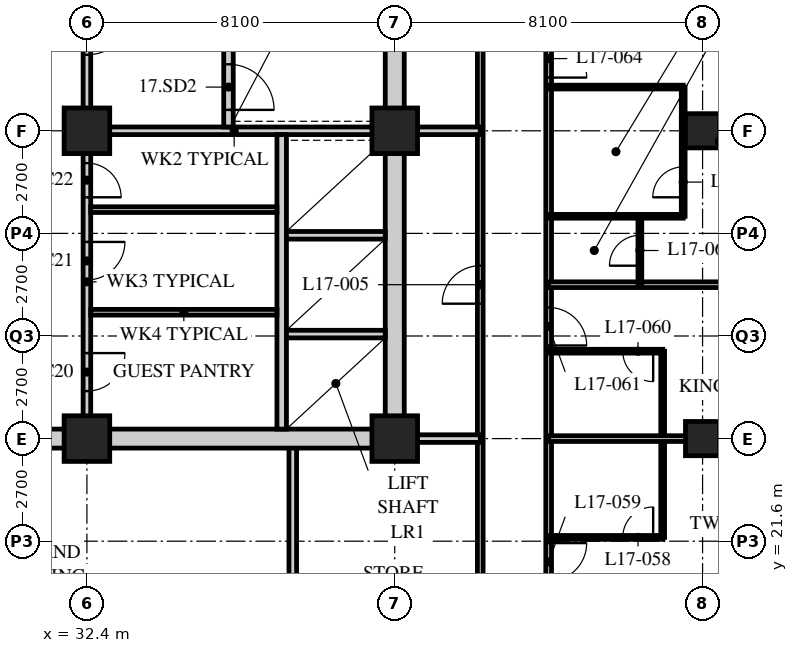
"""IFC4 building model, lengths in metres.
Left out: names, types, materials, properties, quantities, classifications, styles, units other than length and angle.
Written with IfcOpenShell. Run it as: python <this file> out.ifc"""

import sys

from ifc_helpers import new_model, si_unit, direction, frame, frame_2d, origin, origin_2d, place, context, subcontext, project, spatial, rectangle, hollow_rectangle, extrude, element, fill, save


model = new_model("IFC4")
c1 = context("Model", 3, precision=1e-05, world=origin(), true_north=direction((0.0, 1.0)))
c2 = subcontext(c1, "Body", "Model", "MODEL_VIEW")
j1 = project(units=[si_unit("LENGTHUNIT", "METRE"), si_unit("PLANEANGLEUNIT", "RADIAN")], contexts=[c1])
p1 = place(None, origin())
s1 = spatial("IfcSite", under=j1, at=p1, CompositionType="ELEMENT")
p2 = place(p1, origin())
s2 = spatial("IfcBuilding", under=s1, at=p2, CompositionType="ELEMENT")
p3 = place(p2, frame((0.0, 0.0, 70.4)))
s3 = spatial("IfcBuildingStorey", under=s2, at=p3, CompositionType="ELEMENT", Elevation=70.4)
for number, where, z_axis, x_axis in (
    (1, (32.4, 24.3, 0.0), (0.0, 0.0, 1.0), (1.0, 0.0, 0.0)),
    (2, (32.4, 32.4, 0.0), (0.0, 0.0, 1.0), (1.0, 0.0, 0.0)),
    (3, (40.5, 24.3, 0.0), (0.0, 0.0, 1.0), (1.0, 0.0, 0.0)),
    (4, (40.5, 32.4, 0.0), (0.0, 0.0, 1.0), (1.0, 0.0, 0.0)),
):
    element("IfcColumn", number, at=place(p3, frame(where, z_axis=z_axis, x_axis=x_axis)), inside=s3, PredefinedType="COLUMN", context=c2, shape_type="SweptSolid", body=[
        extrude(hollow_rectangle(XDim=1.2, YDim=1.2, WallThickness=0.12, at=origin_2d()), origin(), (0.0, 0.0, 1.0), 3.4),
    ])
for number, where, z_axis, x_axis in (
    (5, (48.6, 24.3, 0.0), (0.0, 0.0, 1.0), (1.0, 0.0, 0.0)),
    (6, (48.6, 32.4, 0.0), (0.0, 0.0, 1.0), (1.0, 0.0, 0.0)),
):
    element("IfcColumn", number, at=place(p3, frame(where, z_axis=z_axis, x_axis=x_axis)), inside=s3, PredefinedType="COLUMN", context=c2, shape_type="SweptSolid", body=[
        extrude(hollow_rectangle(XDim=0.9, YDim=0.9, WallThickness=0.09, at=origin_2d()), origin(), (0.0, 0.0, 1.0), 3.4),
    ])
p4 = place(p3, frame((44.55, 12.15, 0.0), z_axis=(0.0, 0.0, 1.0), x_axis=(0.0, 1.0, 0.0)))
e7 = element("IfcWall", 7, at=p4, inside=s3, PredefinedType="PARTITIONING", context=c2, shape_type="SweptSolid", body=[
    extrude(rectangle(XDim=30.15, YDim=0.15, at=frame_2d((15.075, 0.0))), origin(), (0.0, 0.0, 1.0), 3.19),
])
p5 = place(p4, frame((2.45, 0.0, 0.0)))
e8 = element("IfcOpeningElement", 8, at=p5, cuts=e7, PredefinedType="OPENING", context=c2, shape_type="SweptSolid", body=[
    extrude(rectangle(XDim=1.0, YDim=2.1, at=frame_2d((0.5, 1.05))), frame((0.0, 0.085, 0.0), z_axis=(0.0, -1.0, 0.0), x_axis=(1.0, 0.0, 0.0)), (0.0, 0.0, 1.0), 0.17),
])
p6 = place(p4, frame((4.35, 0.0, 0.0)))
e9 = element("IfcOpeningElement", 9, at=p6, cuts=e7, PredefinedType="OPENING", context=c2, shape_type="SweptSolid", body=[
    extrude(rectangle(XDim=1.0, YDim=2.1, at=frame_2d((0.5, 1.05))), frame((0.0, 0.085, 0.0), z_axis=(0.0, -1.0, 0.0), x_axis=(1.0, 0.0, 0.0)), (0.0, 0.0, 1.0), 0.17),
])
p7 = place(p4, frame((8.4, 0.0, 0.0)))
e10 = element("IfcOpeningElement", 10, at=p7, cuts=e7, PredefinedType="OPENING", context=c2, shape_type="SweptSolid", body=[
    extrude(rectangle(XDim=1.0, YDim=2.1, at=frame_2d((0.5, 1.05))), frame((0.0, 0.085, 0.0), z_axis=(0.0, -1.0, 0.0), x_axis=(1.0, 0.0, 0.0)), (0.0, 0.0, 1.0), 0.17),
])
p8 = place(p4, frame((14.6, 0.0, 0.0)))
e11 = element("IfcOpeningElement", 11, at=p8, cuts=e7, PredefinedType="OPENING", context=c2, shape_type="SweptSolid", body=[
    extrude(rectangle(XDim=1.0, YDim=2.1, at=frame_2d((0.5, 1.05))), frame((0.0, 0.085, 0.0), z_axis=(0.0, -1.0, 0.0), x_axis=(1.0, 0.0, 0.0)), (0.0, 0.0, 1.0), 0.17),
])
p9 = place(p4, frame((21.65, 0.0, 0.0)))
e12 = element("IfcOpeningElement", 12, at=p9, cuts=e7, PredefinedType="OPENING", context=c2, shape_type="SweptSolid", body=[
    extrude(rectangle(XDim=1.0, YDim=2.1, at=frame_2d((0.5, 1.05))), frame((0.0, 0.085, 0.0), z_axis=(0.0, -1.0, 0.0), x_axis=(1.0, 0.0, 0.0)), (0.0, 0.0, 1.0), 0.17),
])
p10 = place(p4, frame((26.7, 0.0, 0.0)))
e13 = element("IfcOpeningElement", 13, at=p10, cuts=e7, PredefinedType="OPENING", context=c2, shape_type="SweptSolid", body=[
    extrude(rectangle(XDim=1.0, YDim=2.1, at=frame_2d((0.5, 1.05))), frame((0.0, 0.085, 0.0), z_axis=(0.0, -1.0, 0.0), x_axis=(1.0, 0.0, 0.0)), (0.0, 0.0, 1.0), 0.17),
])
p11 = place(p3, frame((42.75, 13.95, 0.0), z_axis=(0.0, 0.0, 1.0), x_axis=(0.0, 1.0, 0.0)))
e14 = element("IfcWall", 14, at=p11, inside=s3, PredefinedType="PARTITIONING", context=c2, shape_type="SweptSolid", body=[
    extrude(rectangle(XDim=26.55, YDim=0.15, at=frame_2d((13.275, 0.0))), origin(), (0.0, 0.0, 1.0), 3.19),
])
p12 = place(p11, frame((13.9, 0.0, 0.0)))
e15 = element("IfcOpeningElement", 15, at=p12, cuts=e14, PredefinedType="OPENING", context=c2, shape_type="SweptSolid", body=[
    extrude(rectangle(XDim=1.0, YDim=2.1, at=frame_2d((0.5, 1.05))), frame((0.0, 0.085, 0.0), z_axis=(0.0, -1.0, 0.0), x_axis=(1.0, 0.0, 0.0)), (0.0, 0.0, 1.0), 0.17),
])
p13 = place(p11, frame((22.0, 0.0, 0.0)))
e16 = element("IfcOpeningElement", 16, at=p13, cuts=e14, PredefinedType="OPENING", context=c2, shape_type="SweptSolid", body=[
    extrude(rectangle(XDim=1.0, YDim=2.1, at=frame_2d((0.5, 1.05))), frame((0.0, 0.085, 0.0), z_axis=(0.0, -1.0, 0.0), x_axis=(1.0, 0.0, 0.0)), (0.0, 0.0, 1.0), 0.17),
])
p14 = place(p3, frame((40.5, 32.4, 0.0), z_axis=(0.0, 0.0, 1.0), x_axis=(1.0, 0.0, 0.0)))
e17 = element("IfcWall", 17, at=p14, inside=s3, PredefinedType="SOLIDWALL", context=c2, shape_type="SweptSolid", body=[
    extrude(rectangle(XDim=2.25, YDim=0.2, at=frame_2d((1.125, 0.0))), origin(), (0.0, 0.0, 1.0), 2.578),
])
p15 = place(p3, frame((37.817, 13.95, 0.0), z_axis=(0.0, 0.0, 1.0), x_axis=(0.0, 1.0, 0.0)))
e18 = element("IfcWall", 18, at=p15, inside=s3, PredefinedType="SOLIDWALL", context=c2, shape_type="SweptSolid", body=[
    extrude(rectangle(XDim=10.35, YDim=0.2, at=frame_2d((5.175, 0.0))), origin(), (0.0, 0.0, 1.0), 3.19),
])
p16 = place(p3, frame((40.5, 24.3, 0.0), z_axis=(0.0, 0.0, 1.0), x_axis=(1.0, 0.0, 0.0)))
e19 = element("IfcWall", 19, at=p16, inside=s3, PredefinedType="SOLIDWALL", context=c2, shape_type="SweptSolid", body=[
    extrude(rectangle(XDim=2.25, YDim=0.2, at=frame_2d((1.125, 0.0))), origin(), (0.0, 0.0, 1.0), 2.578),
])
p17 = place(p3, frame((47.55, 21.7, 0.0), z_axis=(0.0, 0.0, 1.0), x_axis=(0.0, 1.0, 0.0)))
e20 = element("IfcWall", 20, at=p17, inside=s3, PredefinedType="PARTITIONING", context=c2, shape_type="SweptSolid", body=[
    extrude(rectangle(XDim=4.9, YDim=0.1, at=frame_2d((2.45, 0.0))), origin(), (0.0, 0.0, 1.0), 3.19),
])
p18 = place(p3, frame((44.55, 21.7, 0.0), z_axis=(0.0, 0.0, 1.0), x_axis=(1.0, 0.0, 0.0)))
e21 = element("IfcWall", 21, at=p18, inside=s3, PredefinedType="PARTITIONING", context=c2, shape_type="SweptSolid", body=[
    extrude(rectangle(XDim=3.0, YDim=0.1, at=frame_2d((1.5, 0.0))), origin(), (0.0, 0.0, 1.0), 3.19),
])
p19 = place(p18, frame((1.95, 0.0, 0.0)))
e22 = element("IfcOpeningElement", 22, at=p19, cuts=e21, PredefinedType="OPENING", context=c2, shape_type="SweptSolid", body=[
    extrude(rectangle(XDim=0.8, YDim=2.1, at=frame_2d((0.4, 1.05))), frame((0.0, 0.06, 0.0), z_axis=(0.0, -1.0, 0.0), x_axis=(1.0, 0.0, 0.0)), (0.0, 0.0, 1.0), 0.12),
])
p20 = place(p3, frame((44.55, 24.3, 0.0), z_axis=(0.0, 0.0, 1.0), x_axis=(1.0, 0.0, 0.0)))
e23 = element("IfcWall", 23, at=p20, inside=s3, PredefinedType="PARTITIONING", context=c2, shape_type="SweptSolid", body=[
    extrude(rectangle(XDim=11.85, YDim=0.15, at=frame_2d((5.925, 0.0))), origin(), (0.0, 0.0, 1.0), 2.578),
])
p21 = place(p3, frame((44.55, 26.6, 0.0), z_axis=(0.0, 0.0, 1.0), x_axis=(1.0, 0.0, 0.0)))
e24 = element("IfcWall", 24, at=p21, inside=s3, PredefinedType="PARTITIONING", context=c2, shape_type="SweptSolid", body=[
    extrude(rectangle(XDim=3.0, YDim=0.1, at=frame_2d((1.5, 0.0))), origin(), (0.0, 0.0, 1.0), 3.19),
])
p22 = place(p21, frame((1.95, 0.0, 0.0)))
e25 = element("IfcOpeningElement", 25, at=p22, cuts=e24, PredefinedType="OPENING", context=c2, shape_type="SweptSolid", body=[
    extrude(rectangle(XDim=0.8, YDim=2.1, at=frame_2d((0.4, 1.05))), frame((0.0, 0.06, 0.0), z_axis=(0.0, -1.0, 0.0), x_axis=(1.0, 0.0, 0.0)), (0.0, 0.0, 1.0), 0.12),
])
p23 = place(p3, frame((44.55, 28.35, 0.0), z_axis=(0.0, 0.0, 1.0), x_axis=(1.0, 0.0, 0.0)))
e26 = element("IfcWall", 26, at=p23, inside=s3, PredefinedType="PARTITIONING", context=c2, shape_type="SweptSolid", body=[
    extrude(rectangle(XDim=11.85, YDim=0.15, at=frame_2d((5.925, 0.0))), origin(), (0.0, 0.0, 1.0), 3.19),
])
p24 = place(p3, frame((48.09, 30.15, 0.0), z_axis=(0.0, 0.0, 1.0), x_axis=(0.0, 1.0, 0.0)))
e27 = element("IfcWall", 27, at=p24, inside=s3, PredefinedType="PARTITIONING", context=c2, shape_type="SweptSolid", body=[
    extrude(rectangle(XDim=3.4, YDim=0.1, at=frame_2d((1.7, 0.0))), origin(), (0.0, 0.0, 1.0), 3.19),
])
p25 = place(p24, frame((0.5, 0.0, 0.0)))
e28 = element("IfcOpeningElement", 28, at=p25, cuts=e27, PredefinedType="OPENING", context=c2, shape_type="SweptSolid", body=[
    extrude(rectangle(XDim=0.8, YDim=2.1, at=frame_2d((0.4, 1.05))), frame((0.0, 0.06, 0.0), z_axis=(0.0, -1.0, 0.0), x_axis=(1.0, 0.0, 0.0)), (0.0, 0.0, 1.0), 0.12),
])
p26 = place(p3, frame((46.95, 28.35, 0.0), z_axis=(0.0, 0.0, 1.0), x_axis=(0.0, 1.0, 0.0)))
e29 = element("IfcWall", 29, at=p26, inside=s3, PredefinedType="PARTITIONING", context=c2, shape_type="SweptSolid", body=[
    extrude(rectangle(XDim=1.8, YDim=0.1, at=frame_2d((0.9, 0.0))), origin(), (0.0, 0.0, 1.0), 3.19),
])
p27 = place(p26, frame((0.5, 0.0, 0.0)))
e30 = element("IfcOpeningElement", 30, at=p27, cuts=e29, PredefinedType="OPENING", context=c2, shape_type="SweptSolid", body=[
    extrude(rectangle(XDim=0.8, YDim=2.1, at=frame_2d((0.4, 1.05))), frame((0.0, 0.06, 0.0), z_axis=(0.0, -1.0, 0.0), x_axis=(1.0, 0.0, 0.0)), (0.0, 0.0, 1.0), 0.12),
])
for number, where, z_axis, x_axis in (
    (31, (44.55, 30.15, 0.0), (0.0, 0.0, 1.0), (1.0, 0.0, 0.0)),
    (32, (44.55, 33.55, 0.0), (0.0, 0.0, 1.0), (1.0, 0.0, 0.0)),
):
    element("IfcWall", number, at=place(p3, frame(where, z_axis=z_axis, x_axis=x_axis)), inside=s3, PredefinedType="PARTITIONING", context=c2, shape_type="SweptSolid", body=[
        extrude(rectangle(XDim=3.54, YDim=0.1, at=frame_2d((1.77, 0.0))), origin(), (0.0, 0.0, 1.0), 3.19),
    ])
p28 = place(p3, frame((15.95, 24.3, 0.0), z_axis=(0.0, 0.0, 1.0), x_axis=(1.0, 0.0, 0.0)))
e33 = element("IfcWall", 33, at=p28, inside=s3, PredefinedType="SOLIDWALL", context=c2, shape_type="SweptSolid", body=[
    extrude(rectangle(XDim=24.8, YDim=0.5, at=frame_2d((12.4, 0.0))), origin(), (0.0, 0.0, 1.0), 2.54),
])
p29 = place(p28, frame((11.5, 0.0, 0.0)))
e34 = element("IfcOpeningElement", 34, at=p29, cuts=e33, PredefinedType="OPENING", context=c2, shape_type="SweptSolid", body=[
    extrude(rectangle(XDim=1.8, YDim=2.4, at=frame_2d((0.9, 1.2))), frame((0.0, 0.26, 0.0), z_axis=(0.0, -1.0, 0.0), x_axis=(1.0, 0.0, 0.0)), (0.0, 0.0, 1.0), 0.52),
])
p30 = place(p3, frame((40.5, 24.55, 0.0), z_axis=(0.0, 0.0, 1.0), x_axis=(0.0, 1.0, 0.0)))
e35 = element("IfcWall", 35, at=p30, inside=s3, PredefinedType="SOLIDWALL", context=c2, shape_type="SweptSolid", body=[
    extrude(rectangle(XDim=15.7, YDim=0.5, at=frame_2d((7.85, 0.0))), origin(), (0.0, 0.0, 1.0), 2.578),
])
p31 = place(p3, frame((32.3, 32.4, 0.0), z_axis=(0.0, 0.0, 1.0), x_axis=(1.0, 0.0, 0.0)))
e36 = element("IfcWall", 36, at=p31, inside=s3, PredefinedType="SOLIDWALL", context=c2, shape_type="SweptSolid", body=[
    extrude(rectangle(XDim=7.95, YDim=0.2, at=frame_2d((3.975, 0.0))), origin(), (0.0, 0.0, 1.0), 2.578),
])
p32 = place(p3, frame((32.4, 32.5, 0.0), z_axis=(0.0, 0.0, 1.0), x_axis=(0.0, 1.0, 0.0)))
e37 = element("IfcWall", 37, at=p32, inside=s3, PredefinedType="SOLIDWALL", context=c2, shape_type="SweptSolid", body=[
    extrude(rectangle(XDim=7.75, YDim=0.2, at=frame_2d((3.875, 0.0))), origin(), (0.0, 0.0, 1.0), 2.578),
])
p33 = place(p32, frame((1.9, 0.0, 0.0)))
e38 = element("IfcOpeningElement", 38, at=p33, cuts=e37, PredefinedType="OPENING", context=c2, shape_type="SweptSolid", body=[
    extrude(rectangle(XDim=1.2, YDim=2.1, at=frame_2d((0.6, 1.05))), frame((0.0, 0.11, 0.0), z_axis=(0.0, -1.0, 0.0), x_axis=(1.0, 0.0, 0.0)), (0.0, 0.0, 1.0), 0.22),
])
p34 = place(p3, frame((37.525, 24.55, 0.0), z_axis=(0.0, 0.0, 1.0), x_axis=(0.0, 1.0, 0.0)))
e39 = element("IfcWall", 39, at=p34, inside=s3, PredefinedType="SOLIDWALL", context=c2, shape_type="SweptSolid", body=[
    extrude(rectangle(XDim=7.75, YDim=0.25, at=frame_2d((3.875, 0.0))), origin(), (0.0, 0.0, 1.0), 3.19),
])
for number, where, z_axis, x_axis in (
    (40, (37.65, 27.05, 0.0), (0.0, 0.0, 1.0), (1.0, 0.0, 0.0)),
    (41, (37.65, 29.65, 0.0), (0.0, 0.0, 1.0), (1.0, 0.0, 0.0)),
):
    element("IfcWall", number, at=place(p3, frame(where, z_axis=z_axis, x_axis=x_axis)), inside=s3, PredefinedType="SOLIDWALL", context=c2, shape_type="SweptSolid", body=[
        extrude(rectangle(XDim=2.6, YDim=0.2, at=frame_2d((1.3, 0.0))), origin(), (0.0, 0.0, 1.0), 3.19),
    ])
p35 = place(p3, frame((36.125, 32.5, 0.0), z_axis=(0.0, 0.0, 1.0), x_axis=(0.0, 1.0, 0.0)))
e42 = element("IfcWall", 42, at=p35, inside=s3, PredefinedType="SOLIDWALL", context=c2, shape_type="SweptSolid", body=[
    extrude(rectangle(XDim=7.75, YDim=0.25, at=frame_2d((3.875, 0.0))), origin(), (0.0, 0.0, 1.0), 3.19),
])
p36 = place(p35, frame((0.45, 0.0, 0.0)))
e43 = element("IfcOpeningElement", 43, at=p36, cuts=e42, PredefinedType="OPENING", context=c2, shape_type="SweptSolid", body=[
    extrude(rectangle(XDim=1.2, YDim=2.1, at=frame_2d((0.6, 1.05))), frame((0.0, 0.135, 0.0), z_axis=(0.0, -1.0, 0.0), x_axis=(1.0, 0.0, 0.0)), (0.0, 0.0, 1.0), 0.27),
])
p37 = place(p3, frame((32.4, 24.55, 0.0), z_axis=(0.0, 0.0, 1.0), x_axis=(0.0, 1.0, 0.0)))
e44 = element("IfcWall", 44, at=p37, inside=s3, PredefinedType="PARTITIONING", context=c2, shape_type="SweptSolid", body=[
    extrude(rectangle(XDim=7.75, YDim=0.2, at=frame_2d((3.875, 0.0))), origin(), (0.0, 0.0, 1.0), 2.578),
])
p38 = place(p37, frame((1.0, 0.0, 0.0)))
e45 = element("IfcOpeningElement", 45, at=p38, cuts=e44, PredefinedType="OPENING", context=c2, shape_type="SweptSolid", body=[
    extrude(rectangle(XDim=1.0, YDim=2.1, at=frame_2d((0.5, 1.05))), frame((0.0, 0.11, 0.0), z_axis=(0.0, -1.0, 0.0), x_axis=(1.0, 0.0, 0.0)), (0.0, 0.0, 1.0), 0.22),
])
p39 = place(p37, frame((3.925, 0.0, 0.0)))
e46 = element("IfcOpeningElement", 46, at=p39, cuts=e44, PredefinedType="OPENING", context=c2, shape_type="SweptSolid", body=[
    extrude(rectangle(XDim=1.0, YDim=2.1, at=frame_2d((0.5, 1.05))), frame((0.0, 0.11, 0.0), z_axis=(0.0, -1.0, 0.0), x_axis=(1.0, 0.0, 0.0)), (0.0, 0.0, 1.0), 0.22),
])
p40 = place(p37, frame((6.1, 0.0, 0.0)))
e47 = element("IfcOpeningElement", 47, at=p40, cuts=e44, PredefinedType="OPENING", context=c2, shape_type="SweptSolid", body=[
    extrude(rectangle(XDim=0.9, YDim=2.1, at=frame_2d((0.45, 1.05))), frame((0.0, 0.11, 0.0), z_axis=(0.0, -1.0, 0.0), x_axis=(1.0, 0.0, 0.0)), (0.0, 0.0, 1.0), 0.22),
])
for number, where, z_axis, x_axis in (
    (48, (32.5, 27.625, 0.0), (0.0, 0.0, 1.0), (1.0, 0.0, 0.0)),
    (49, (32.5, 30.325, 0.0), (0.0, 0.0, 1.0), (1.0, 0.0, 0.0)),
):
    element("IfcWall", number, at=place(p3, frame(where, z_axis=z_axis, x_axis=x_axis)), inside=s3, PredefinedType="PARTITIONING", context=c2, shape_type="SweptSolid", body=[
        extrude(rectangle(XDim=4.9, YDim=0.15, at=frame_2d((2.45, 0.0))), origin(), (0.0, 0.0, 1.0), 3.19),
    ])
p41 = place(p12, origin())
e50 = element("IfcDoor", 50, at=p41, inside=s3, OperationType="SINGLE_SWING_LEFT", PredefinedType="DOOR", context=c2, shape_type="SweptSolid", body=[
    extrude(rectangle(XDim=1.0, YDim=2.1, at=frame_2d((0.5, 1.05))), frame((0.0, 0.025, 0.0), z_axis=(0.0, -1.0, 0.0), x_axis=(1.0, 0.0, 0.0)), (0.0, 0.0, 1.0), 0.05),
])
fill(e15, e50)
p42 = place(p19, origin())
e51 = element("IfcDoor", 51, at=p42, inside=s3, OperationType="SINGLE_SWING_RIGHT", PredefinedType="DOOR", context=c2, shape_type="SweptSolid", body=[
    extrude(rectangle(XDim=0.8, YDim=2.1, at=frame_2d((0.4, 1.05))), frame((0.0, 0.025, 0.0), z_axis=(0.0, -1.0, 0.0), x_axis=(1.0, 0.0, 0.0)), (0.0, 0.0, 1.0), 0.05),
])
fill(e22, e51)
p43 = place(p7, origin())
e52 = element("IfcDoor", 52, at=p43, inside=s3, OperationType="SINGLE_SWING_LEFT", PredefinedType="DOOR", context=c2, shape_type="SweptSolid", body=[
    extrude(rectangle(XDim=1.0, YDim=2.1, at=frame_2d((0.5, 1.05))), frame((0.0, 0.025, 0.0), z_axis=(0.0, -1.0, 0.0), x_axis=(1.0, 0.0, 0.0)), (0.0, 0.0, 1.0), 0.05),
])
fill(e10, e52)
p44 = place(p22, origin())
e53 = element("IfcDoor", 53, at=p44, inside=s3, OperationType="SINGLE_SWING_LEFT", PredefinedType="DOOR", context=c2, shape_type="SweptSolid", body=[
    extrude(rectangle(XDim=0.8, YDim=2.1, at=frame_2d((0.4, 1.05))), frame((0.0, 0.025, 0.0), z_axis=(0.0, -1.0, 0.0), x_axis=(1.0, 0.0, 0.0)), (0.0, 0.0, 1.0), 0.05),
])
fill(e25, e53)
p45 = place(p8, origin())
e54 = element("IfcDoor", 54, at=p45, inside=s3, OperationType="SINGLE_SWING_RIGHT", PredefinedType="DOOR", context=c2, shape_type="SweptSolid", body=[
    extrude(rectangle(XDim=1.0, YDim=2.1, at=frame_2d((0.5, 1.05))), frame((0.0, 0.025, 0.0), z_axis=(0.0, -1.0, 0.0), x_axis=(1.0, 0.0, 0.0)), (0.0, 0.0, 1.0), 0.05),
])
fill(e11, e54)
p46 = place(p25, origin())
e55 = element("IfcDoor", 55, at=p46, inside=s3, OperationType="SINGLE_SWING_LEFT", PredefinedType="DOOR", context=c2, shape_type="SweptSolid", body=[
    extrude(rectangle(XDim=0.8, YDim=2.1, at=frame_2d((0.4, 1.05))), frame((0.0, 0.025, 0.0), z_axis=(0.0, -1.0, 0.0), x_axis=(1.0, 0.0, 0.0)), (0.0, 0.0, 1.0), 0.05),
])
fill(e28, e55)
p47 = place(p27, origin())
e56 = element("IfcDoor", 56, at=p47, inside=s3, OperationType="SINGLE_SWING_LEFT", PredefinedType="DOOR", context=c2, shape_type="SweptSolid", body=[
    extrude(rectangle(XDim=0.8, YDim=2.1, at=frame_2d((0.4, 1.05))), frame((0.0, 0.025, 0.0), z_axis=(0.0, -1.0, 0.0), x_axis=(1.0, 0.0, 0.0)), (0.0, 0.0, 1.0), 0.05),
])
fill(e30, e56)
p48 = place(p9, origin())
e57 = element("IfcDoor", 57, at=p48, inside=s3, OperationType="SINGLE_SWING_RIGHT", PredefinedType="DOOR", context=c2, shape_type="SweptSolid", body=[
    extrude(rectangle(XDim=1.0, YDim=2.1, at=frame_2d((0.5, 1.05))), frame((0.0, 0.025, 0.0), z_axis=(0.0, -1.0, 0.0), x_axis=(1.0, 0.0, 0.0)), (0.0, 0.0, 1.0), 0.05),
])
fill(e12, e57)
p49 = place(p38, origin())
e58 = element("IfcDoor", 58, at=p49, inside=s3, OperationType="SINGLE_SWING_LEFT", PredefinedType="DOOR", context=c2, shape_type="SweptSolid", body=[
    extrude(rectangle(XDim=1.0, YDim=2.1, at=frame_2d((0.5, 1.05))), frame((0.0, 0.025, 0.0), z_axis=(0.0, -1.0, 0.0), x_axis=(1.0, 0.0, 0.0)), (0.0, 0.0, 1.0), 0.05),
])
fill(e45, e58)
p50 = place(p39, origin())
e59 = element("IfcDoor", 59, at=p50, inside=s3, OperationType="SINGLE_SWING_LEFT", PredefinedType="DOOR", context=c2, shape_type="SweptSolid", body=[
    extrude(rectangle(XDim=1.0, YDim=2.1, at=frame_2d((0.5, 1.05))), frame((0.0, 0.025, 0.0), z_axis=(0.0, -1.0, 0.0), x_axis=(1.0, 0.0, 0.0)), (0.0, 0.0, 1.0), 0.05),
])
fill(e46, e59)
p51 = place(p40, origin())
e60 = element("IfcDoor", 60, at=p51, inside=s3, OperationType="SINGLE_SWING_RIGHT", PredefinedType="DOOR", context=c2, shape_type="SweptSolid", body=[
    extrude(rectangle(XDim=0.9, YDim=2.1, at=frame_2d((0.45, 1.05))), frame((0.0, 0.025, 0.0), z_axis=(0.0, -1.0, 0.0), x_axis=(1.0, 0.0, 0.0)), (0.0, 0.0, 1.0), 0.05),
])
fill(e47, e60)
p52 = place(p36, origin())
e61 = element("IfcDoor", 61, at=p52, inside=s3, OperationType="SINGLE_SWING_RIGHT", PredefinedType="DOOR", context=c2, shape_type="SweptSolid", body=[
    extrude(rectangle(XDim=1.2, YDim=2.1, at=frame_2d((0.6, 1.05))), frame((0.0, 0.025, 0.0), z_axis=(0.0, -1.0, 0.0), x_axis=(1.0, 0.0, 0.0)), (0.0, 0.0, 1.0), 0.05),
])
fill(e43, e61)
p53 = place(p33, origin())
e62 = element("IfcDoor", 62, at=p53, inside=s3, OperationType="SINGLE_SWING_LEFT", PredefinedType="DOOR", context=c2, shape_type="SweptSolid", body=[
    extrude(rectangle(XDim=1.2, YDim=2.1, at=frame_2d((0.6, 1.05))), frame((0.0, 0.025, 0.0), z_axis=(0.0, -1.0, 0.0), x_axis=(1.0, 0.0, 0.0)), (0.0, 0.0, 1.0), 0.05),
])
fill(e38, e62)
save(model, sys.argv[1])
